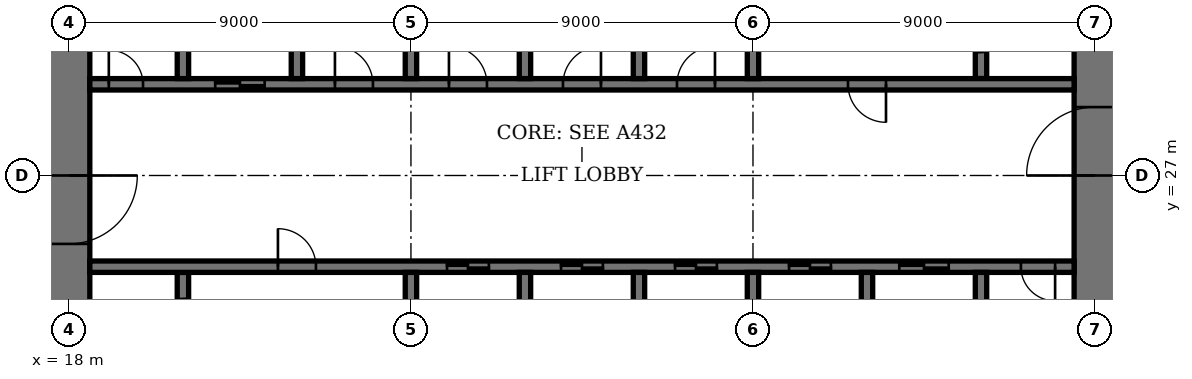
"""IFC4 building model, lengths in metres.
Left out: names, types, materials, properties, quantities, classifications, styles, units other than length and angle.
Written with IfcOpenShell. Run it as: python <this file> out.ifc"""

import sys

from ifc_helpers import new_model, si_unit, direction, frame, frame_2d, origin, place, context, subcontext, project, spatial, rectangle, extrude, element, fill, save


model = new_model("IFC4")
c1 = context("Model", 3, precision=1e-05, world=origin(), true_north=direction((0.0, 1.0)))
c2 = subcontext(c1, "Body", "Model", "MODEL_VIEW")
j1 = project(units=[si_unit("LENGTHUNIT", "METRE"), si_unit("PLANEANGLEUNIT", "RADIAN")], contexts=[c1])
p1 = place(None, origin())
s1 = spatial("IfcSite", under=j1, at=p1, CompositionType="ELEMENT")
p2 = place(p1, origin())
s2 = spatial("IfcBuilding", under=s1, at=p2, CompositionType="ELEMENT")
p3 = place(p2, frame((0.0, 0.0, 287.4)))
s3 = spatial("IfcBuildingStorey", under=s2, at=p3, CompositionType="ELEMENT", Elevation=287.4)
p4 = place(p3, frame((18.0, 35.45, 0.0), z_axis=(0.0, 0.0, 1.0), x_axis=(0.0, -1.0, 0.0)))
e1 = element("IfcWall", 1, at=p4, inside=s3, PredefinedType="SHEAR", context=c2, shape_type="SweptSolid", body=[
    extrude(rectangle(XDim=16.9, YDim=1.1, at=frame_2d((8.45, 0.0))), origin(), (0.0, 0.0, 1.0), 4.0),
])
p5 = place(p4, frame((8.45, 0.0, 0.0)))
e2 = element("IfcOpeningElement", 2, at=p5, cuts=e1, PredefinedType="OPENING", context=c2, shape_type="SweptSolid", body=[
    extrude(rectangle(XDim=1.8, YDim=2.4, at=frame_2d((0.9, 1.2))), frame((0.0, 0.56, 0.0), z_axis=(0.0, -1.0, 0.0), x_axis=(1.0, 0.0, 0.0)), (0.0, 0.0, 1.0), 1.12),
])
p6 = place(p3, frame((45.0, 18.55, 0.0), z_axis=(0.0, 0.0, 1.0), x_axis=(0.0, 1.0, 0.0)))
e3 = element("IfcWall", 3, at=p6, inside=s3, PredefinedType="SHEAR", context=c2, shape_type="SweptSolid", body=[
    extrude(rectangle(XDim=16.9, YDim=1.1, at=frame_2d((8.45, 0.0))), origin(), (0.0, 0.0, 1.0), 4.0),
])
p7 = place(p6, frame((8.45, 0.0, 0.0)))
e4 = element("IfcOpeningElement", 4, at=p7, cuts=e3, PredefinedType="OPENING", context=c2, shape_type="SweptSolid", body=[
    extrude(rectangle(XDim=1.8, YDim=2.4, at=frame_2d((0.9, 1.2))), frame((0.0, 0.56, 0.0), z_axis=(0.0, -1.0, 0.0), x_axis=(1.0, 0.0, 0.0)), (0.0, 0.0, 1.0), 1.12),
])
p8 = place(p3, frame((21.0, 21.95, 0.0), z_axis=(0.0, 0.0, 1.0), x_axis=(0.0, 1.0, 0.0)))
e5 = element("IfcWall", 5, at=p8, inside=s3, PredefinedType="SHEAR", context=c2, shape_type="SweptSolid", body=[
    extrude(rectangle(XDim=2.5, YDim=0.3, at=frame_2d((1.25, 0.0))), origin(), (0.0, 0.0, 1.0), 4.0),
])
p9 = place(p8, frame((0.7, 0.0, 0.0)))
e6 = element("IfcOpeningElement", 6, at=p9, cuts=e5, PredefinedType="OPENING", context=c2, shape_type="SweptSolid", body=[
    extrude(rectangle(XDim=1.1, YDim=2.4, at=frame_2d((0.55, 1.2))), frame((0.0, 0.16, 0.0), z_axis=(0.0, -1.0, 0.0), x_axis=(1.0, 0.0, 0.0)), (0.0, 0.0, 1.0), 0.32),
])
p10 = place(p3, frame((42.0, 29.55, 0.0), z_axis=(0.0, 0.0, 1.0), x_axis=(0.0, 1.0, 0.0)))
e7 = element("IfcWall", 7, at=p10, inside=s3, PredefinedType="SHEAR", context=c2, shape_type="SweptSolid", body=[
    extrude(rectangle(XDim=2.5, YDim=0.3, at=frame_2d((1.25, 0.0))), origin(), (0.0, 0.0, 1.0), 4.0),
])
p11 = place(p10, frame((0.7, 0.0, 0.0)))
e8 = element("IfcOpeningElement", 8, at=p11, cuts=e7, PredefinedType="OPENING", context=c2, shape_type="SweptSolid", body=[
    extrude(rectangle(XDim=1.1, YDim=2.4, at=frame_2d((0.55, 1.2))), frame((0.0, 0.16, 0.0), z_axis=(0.0, -1.0, 0.0), x_axis=(1.0, 0.0, 0.0)), (0.0, 0.0, 1.0), 0.32),
])
p12 = place(p3, frame((18.55, 24.6, 0.0), z_axis=(0.0, 0.0, 1.0), x_axis=(1.0, 0.0, 0.0)))
e9 = element("IfcWall", 9, at=p12, inside=s3, PredefinedType="SHEAR", context=c2, shape_type="SweptSolid", body=[
    extrude(rectangle(XDim=25.9, YDim=0.3, at=frame_2d((12.95, 0.0))), origin(), (0.0, 0.0, 1.0), 4.0),
])
p13 = place(p12, frame((4.95, 0.0, 0.0)))
e10 = element("IfcOpeningElement", 10, at=p13, cuts=e9, PredefinedType="OPENING", context=c2, shape_type="SweptSolid", body=[
    extrude(rectangle(XDim=1.0, YDim=2.4, at=frame_2d((0.5, 1.2))), frame((0.0, 0.16, 0.0), z_axis=(0.0, -1.0, 0.0), x_axis=(1.0, 0.0, 0.0)), (0.0, 0.0, 1.0), 0.32),
])
p14 = place(p12, frame((24.5, 0.0, 0.0)))
e11 = element("IfcOpeningElement", 11, at=p14, cuts=e9, PredefinedType="OPENING", context=c2, shape_type="SweptSolid", body=[
    extrude(rectangle(XDim=0.9, YDim=2.1, at=frame_2d((0.45, 1.05))), frame((0.0, 0.16, 0.0), z_axis=(0.0, -1.0, 0.0), x_axis=(1.0, 0.0, 0.0)), (0.0, 0.0, 1.0), 0.32),
])
p15 = place(p12, frame((9.4, 0.0, 0.0)))
e12 = element("IfcOpeningElement", 12, at=p15, cuts=e9, PredefinedType="OPENING", context=c2, shape_type="SweptSolid", body=[
    extrude(rectangle(XDim=1.1, YDim=2.4, at=frame_2d((0.55, 1.2))), frame((0.0, 0.16, 0.0), z_axis=(0.0, -1.0, 0.0), x_axis=(1.0, 0.0, 0.0)), (0.0, 0.0, 1.0), 0.32),
])
p16 = place(p12, frame((12.4, 0.0, 0.0)))
e13 = element("IfcOpeningElement", 13, at=p16, cuts=e9, PredefinedType="OPENING", context=c2, shape_type="SweptSolid", body=[
    extrude(rectangle(XDim=1.1, YDim=2.4, at=frame_2d((0.55, 1.2))), frame((0.0, 0.16, 0.0), z_axis=(0.0, -1.0, 0.0), x_axis=(1.0, 0.0, 0.0)), (0.0, 0.0, 1.0), 0.32),
])
p17 = place(p12, frame((15.4, 0.0, 0.0)))
e14 = element("IfcOpeningElement", 14, at=p17, cuts=e9, PredefinedType="OPENING", context=c2, shape_type="SweptSolid", body=[
    extrude(rectangle(XDim=1.1, YDim=2.4, at=frame_2d((0.55, 1.2))), frame((0.0, 0.16, 0.0), z_axis=(0.0, -1.0, 0.0), x_axis=(1.0, 0.0, 0.0)), (0.0, 0.0, 1.0), 0.32),
])
p18 = place(p12, frame((18.4, 0.0, 0.0)))
e15 = element("IfcOpeningElement", 15, at=p18, cuts=e9, PredefinedType="OPENING", context=c2, shape_type="SweptSolid", body=[
    extrude(rectangle(XDim=1.1, YDim=2.4, at=frame_2d((0.55, 1.2))), frame((0.0, 0.16, 0.0), z_axis=(0.0, -1.0, 0.0), x_axis=(1.0, 0.0, 0.0)), (0.0, 0.0, 1.0), 0.32),
])
p19 = place(p12, frame((21.3, 0.0, 0.0)))
e16 = element("IfcOpeningElement", 16, at=p19, cuts=e9, PredefinedType="OPENING", context=c2, shape_type="SweptSolid", body=[
    extrude(rectangle(XDim=1.3, YDim=2.4, at=frame_2d((0.65, 1.2))), frame((0.0, 0.16, 0.0), z_axis=(0.0, -1.0, 0.0), x_axis=(1.0, 0.0, 0.0)), (0.0, 0.0, 1.0), 0.32),
])
p20 = place(p3, frame((18.55, 29.4, 0.0), z_axis=(0.0, 0.0, 1.0), x_axis=(1.0, 0.0, 0.0)))
e17 = element("IfcWall", 17, at=p20, inside=s3, PredefinedType="SHEAR", context=c2, shape_type="SweptSolid", body=[
    extrude(rectangle(XDim=25.9, YDim=0.3, at=frame_2d((12.95, 0.0))), origin(), (0.0, 0.0, 1.0), 4.0),
])
p21 = place(p20, frame((19.95, 0.0, 0.0)))
e18 = element("IfcOpeningElement", 18, at=p21, cuts=e17, PredefinedType="OPENING", context=c2, shape_type="SweptSolid", body=[
    extrude(rectangle(XDim=1.0, YDim=2.4, at=frame_2d((0.5, 1.2))), frame((0.0, 0.16, 0.0), z_axis=(0.0, -1.0, 0.0), x_axis=(1.0, 0.0, 0.0)), (0.0, 0.0, 1.0), 0.32),
])
p22 = place(p20, frame((0.5, 0.0, 0.0)))
e19 = element("IfcOpeningElement", 19, at=p22, cuts=e17, PredefinedType="OPENING", context=c2, shape_type="SweptSolid", body=[
    extrude(rectangle(XDim=0.9, YDim=2.1, at=frame_2d((0.45, 1.05))), frame((0.0, 0.16, 0.0), z_axis=(0.0, -1.0, 0.0), x_axis=(1.0, 0.0, 0.0)), (0.0, 0.0, 1.0), 0.32),
])
p23 = place(p20, frame((15.45, 0.0, 0.0)))
e20 = element("IfcOpeningElement", 20, at=p23, cuts=e17, PredefinedType="OPENING", context=c2, shape_type="SweptSolid", body=[
    extrude(rectangle(XDim=1.0, YDim=2.4, at=frame_2d((0.5, 1.2))), frame((0.0, 0.16, 0.0), z_axis=(0.0, -1.0, 0.0), x_axis=(1.0, 0.0, 0.0)), (0.0, 0.0, 1.0), 0.32),
])
p24 = place(p20, frame((12.45, 0.0, 0.0)))
e21 = element("IfcOpeningElement", 21, at=p24, cuts=e17, PredefinedType="OPENING", context=c2, shape_type="SweptSolid", body=[
    extrude(rectangle(XDim=1.0, YDim=2.4, at=frame_2d((0.5, 1.2))), frame((0.0, 0.16, 0.0), z_axis=(0.0, -1.0, 0.0), x_axis=(1.0, 0.0, 0.0)), (0.0, 0.0, 1.0), 0.32),
])
p25 = place(p20, frame((9.45, 0.0, 0.0)))
e22 = element("IfcOpeningElement", 22, at=p25, cuts=e17, PredefinedType="OPENING", context=c2, shape_type="SweptSolid", body=[
    extrude(rectangle(XDim=1.0, YDim=2.4, at=frame_2d((0.5, 1.2))), frame((0.0, 0.16, 0.0), z_axis=(0.0, -1.0, 0.0), x_axis=(1.0, 0.0, 0.0)), (0.0, 0.0, 1.0), 0.32),
])
p26 = place(p20, frame((6.45, 0.0, 0.0)))
e23 = element("IfcOpeningElement", 23, at=p26, cuts=e17, PredefinedType="OPENING", context=c2, shape_type="SweptSolid", body=[
    extrude(rectangle(XDim=1.0, YDim=2.4, at=frame_2d((0.5, 1.2))), frame((0.0, 0.16, 0.0), z_axis=(0.0, -1.0, 0.0), x_axis=(1.0, 0.0, 0.0)), (0.0, 0.0, 1.0), 0.32),
])
p27 = place(p20, frame((3.3, 0.0, 0.0)))
e24 = element("IfcOpeningElement", 24, at=p27, cuts=e17, PredefinedType="OPENING", context=c2, shape_type="SweptSolid", body=[
    extrude(rectangle(XDim=1.3, YDim=2.4, at=frame_2d((0.65, 1.2))), frame((0.0, 0.16, 0.0), z_axis=(0.0, -1.0, 0.0), x_axis=(1.0, 0.0, 0.0)), (0.0, 0.0, 1.0), 0.32),
])
for number, where, z_axis, x_axis in (
    (25, (30.0, 21.75, 0.0), (0.0, 0.0, 1.0), (0.0, 1.0, 0.0)),
    (26, (33.0, 29.55, 0.0), (0.0, 0.0, 1.0), (0.0, 1.0, 0.0)),
    (27, (33.0, 21.75, 0.0), (0.0, 0.0, 1.0), (0.0, 1.0, 0.0)),
    (28, (30.0, 29.55, 0.0), (0.0, 0.0, 1.0), (0.0, 1.0, 0.0)),
    (29, (36.0, 21.75, 0.0), (0.0, 0.0, 1.0), (0.0, 1.0, 0.0)),
    (30, (27.0, 29.55, 0.0), (0.0, 0.0, 1.0), (0.0, 1.0, 0.0)),
):
    element("IfcWall", number, at=place(p3, frame(where, z_axis=z_axis, x_axis=x_axis)), inside=s3, PredefinedType="SHEAR", context=c2, shape_type="SweptSolid", body=[
        extrude(rectangle(XDim=2.7, YDim=0.3, at=frame_2d((1.35, 0.0))), origin(), (0.0, 0.0, 1.0), 4.0),
    ])
for number, where, z_axis, x_axis in (
    (31, (39.0, 18.55, 0.0), (0.0, 0.0, 1.0), (0.0, 1.0, 0.0)),
    (32, (24.0, 29.55, 0.0), (0.0, 0.0, 1.0), (0.0, 1.0, 0.0)),
):
    element("IfcWall", number, at=place(p3, frame(where, z_axis=z_axis, x_axis=x_axis)), inside=s3, PredefinedType="SHEAR", context=c2, shape_type="SweptSolid", body=[
        extrude(rectangle(XDim=5.9, YDim=0.3, at=frame_2d((2.95, 0.0))), origin(), (0.0, 0.0, 1.0), 4.0),
    ])
for number, where, z_axis, x_axis in (
    (33, (42.0, 21.75, 0.0), (0.0, 0.0, 1.0), (0.0, 1.0, 0.0)),
    (34, (21.0, 29.55, 0.0), (0.0, 0.0, 1.0), (0.0, 1.0, 0.0)),
):
    element("IfcWall", number, at=place(p3, frame(where, z_axis=z_axis, x_axis=x_axis)), inside=s3, PredefinedType="SHEAR", context=c2, shape_type="SweptSolid", body=[
        extrude(rectangle(XDim=2.7, YDim=0.3, at=frame_2d((1.35, 0.0))), origin(), (0.0, 0.0, 1.0), 4.0),
    ])
for number, where, z_axis, x_axis in (
    (35, (27.0, 21.6, 0.0), (0.0, 0.0, 1.0), (0.0, 1.0, 0.0)),
    (36, (36.0, 29.55, 0.0), (0.0, 0.0, 1.0), (0.0, 1.0, 0.0)),
):
    element("IfcWall", number, at=place(p3, frame(where, z_axis=z_axis, x_axis=x_axis)), inside=s3, PredefinedType="SHEAR", context=c2, shape_type="SweptSolid", body=[
        extrude(rectangle(XDim=2.85, YDim=0.3, at=frame_2d((1.425, 0.0))), origin(), (0.0, 0.0, 1.0), 4.0),
    ])
p28 = place(p5, origin())
e37 = element("IfcDoor", 37, at=p28, inside=s3, OperationType="DOUBLE_DOOR_DOUBLE_SWING", PredefinedType="DOOR", context=c2, shape_type="SweptSolid", body=[
    extrude(rectangle(XDim=1.8, YDim=2.4, at=frame_2d((0.9, 1.2))), frame((0.0, 0.03, 0.0), z_axis=(0.0, -1.0, 0.0), x_axis=(1.0, 0.0, 0.0)), (0.0, 0.0, 1.0), 0.06),
    extrude(rectangle(XDim=0.04, YDim=2.4, at=frame_2d((0.02, 1.2))), frame((0.0, 0.55, 0.0), z_axis=(0.0, -1.0, 0.0), x_axis=(1.0, 0.0, 0.0)), (0.0, 0.0, 1.0), 1.1),
    extrude(rectangle(XDim=0.04, YDim=2.4, at=frame_2d((1.78, 1.2))), frame((0.0, 0.55, 0.0), z_axis=(0.0, -1.0, 0.0), x_axis=(1.0, 0.0, 0.0)), (0.0, 0.0, 1.0), 1.1),
    extrude(rectangle(XDim=1.8, YDim=0.04, at=frame_2d((0.9, 2.38))), frame((0.0, 0.55, 0.0), z_axis=(0.0, -1.0, 0.0), x_axis=(1.0, 0.0, 0.0)), (0.0, 0.0, 1.0), 1.1),
])
fill(e2, e37)
p29 = place(p7, origin())
e38 = element("IfcDoor", 38, at=p29, inside=s3, OperationType="DOUBLE_DOOR_DOUBLE_SWING", PredefinedType="DOOR", context=c2, shape_type="SweptSolid", body=[
    extrude(rectangle(XDim=1.8, YDim=2.4, at=frame_2d((0.9, 1.2))), frame((0.0, 0.03, 0.0), z_axis=(0.0, -1.0, 0.0), x_axis=(1.0, 0.0, 0.0)), (0.0, 0.0, 1.0), 0.06),
    extrude(rectangle(XDim=0.04, YDim=2.4, at=frame_2d((0.02, 1.2))), frame((0.0, 0.55, 0.0), z_axis=(0.0, -1.0, 0.0), x_axis=(1.0, 0.0, 0.0)), (0.0, 0.0, 1.0), 1.1),
    extrude(rectangle(XDim=0.04, YDim=2.4, at=frame_2d((1.78, 1.2))), frame((0.0, 0.55, 0.0), z_axis=(0.0, -1.0, 0.0), x_axis=(1.0, 0.0, 0.0)), (0.0, 0.0, 1.0), 1.1),
    extrude(rectangle(XDim=1.8, YDim=0.04, at=frame_2d((0.9, 2.38))), frame((0.0, 0.55, 0.0), z_axis=(0.0, -1.0, 0.0), x_axis=(1.0, 0.0, 0.0)), (0.0, 0.0, 1.0), 1.1),
])
fill(e4, e38)
p30 = place(p13, origin())
e39 = element("IfcDoor", 39, at=p30, inside=s3, OperationType="SINGLE_SWING_RIGHT", PredefinedType="DOOR", context=c2, shape_type="SweptSolid", body=[
    extrude(rectangle(XDim=1.0, YDim=2.4, at=frame_2d((0.5, 1.2))), frame((0.0, 0.03, 0.0), z_axis=(0.0, -1.0, 0.0), x_axis=(1.0, 0.0, 0.0)), (0.0, 0.0, 1.0), 0.06),
])
fill(e10, e39)
p31 = place(p21, origin())
e40 = element("IfcDoor", 40, at=p31, inside=s3, OperationType="SINGLE_SWING_RIGHT", PredefinedType="DOOR", context=c2, shape_type="SweptSolid", body=[
    extrude(rectangle(XDim=1.0, YDim=2.4, at=frame_2d((0.5, 1.2))), frame((0.0, 0.03, 0.0), z_axis=(0.0, -1.0, 0.0), x_axis=(1.0, 0.0, 0.0)), (0.0, 0.0, 1.0), 0.06),
])
fill(e18, e40)
p32 = place(p14, origin())
e41 = element("IfcDoor", 41, at=p32, inside=s3, OperationType="SINGLE_SWING_RIGHT", PredefinedType="DOOR", context=c2, shape_type="SweptSolid", body=[
    extrude(rectangle(XDim=0.9, YDim=2.1, at=frame_2d((0.45, 1.05))), frame((0.0, 0.03, 0.0), z_axis=(0.0, -1.0, 0.0), x_axis=(1.0, 0.0, 0.0)), (0.0, 0.0, 1.0), 0.06),
])
fill(e11, e41)
p33 = place(p22, origin())
e42 = element("IfcDoor", 42, at=p33, inside=s3, OperationType="SINGLE_SWING_RIGHT", PredefinedType="DOOR", context=c2, shape_type="SweptSolid", body=[
    extrude(rectangle(XDim=0.9, YDim=2.1, at=frame_2d((0.45, 1.05))), frame((0.0, 0.03, 0.0), z_axis=(0.0, -1.0, 0.0), x_axis=(1.0, 0.0, 0.0)), (0.0, 0.0, 1.0), 0.06),
])
fill(e19, e42)
p34 = place(p15, origin())
e43 = element("IfcDoor", 43, at=p34, inside=s3, OperationType="DOUBLE_DOOR_SLIDING", PredefinedType="DOOR", context=c2, shape_type="SweptSolid", body=[
    extrude(rectangle(XDim=1.1, YDim=2.4, at=frame_2d((0.55, 1.2))), frame((0.0, 0.02, 0.0), z_axis=(0.0, -1.0, 0.0), x_axis=(1.0, 0.0, 0.0)), (0.0, 0.0, 1.0), 0.04),
])
fill(e12, e43)
p35 = place(p16, origin())
e44 = element("IfcDoor", 44, at=p35, inside=s3, OperationType="DOUBLE_DOOR_SLIDING", PredefinedType="DOOR", context=c2, shape_type="SweptSolid", body=[
    extrude(rectangle(XDim=1.1, YDim=2.4, at=frame_2d((0.55, 1.2))), frame((0.0, 0.02, 0.0), z_axis=(0.0, -1.0, 0.0), x_axis=(1.0, 0.0, 0.0)), (0.0, 0.0, 1.0), 0.04),
])
fill(e13, e44)
p36 = place(p17, origin())
e45 = element("IfcDoor", 45, at=p36, inside=s3, OperationType="DOUBLE_DOOR_SLIDING", PredefinedType="DOOR", context=c2, shape_type="SweptSolid", body=[
    extrude(rectangle(XDim=1.1, YDim=2.4, at=frame_2d((0.55, 1.2))), frame((0.0, 0.02, 0.0), z_axis=(0.0, -1.0, 0.0), x_axis=(1.0, 0.0, 0.0)), (0.0, 0.0, 1.0), 0.04),
])
fill(e14, e45)
p37 = place(p18, origin())
e46 = element("IfcDoor", 46, at=p37, inside=s3, OperationType="DOUBLE_DOOR_SLIDING", PredefinedType="DOOR", context=c2, shape_type="SweptSolid", body=[
    extrude(rectangle(XDim=1.1, YDim=2.4, at=frame_2d((0.55, 1.2))), frame((0.0, 0.02, 0.0), z_axis=(0.0, -1.0, 0.0), x_axis=(1.0, 0.0, 0.0)), (0.0, 0.0, 1.0), 0.04),
])
fill(e15, e46)
p38 = place(p23, origin())
e47 = element("IfcDoor", 47, at=p38, inside=s3, OperationType="SINGLE_SWING_LEFT", PredefinedType="DOOR", context=c2, shape_type="SweptSolid", body=[
    extrude(rectangle(XDim=1.0, YDim=2.4, at=frame_2d((0.5, 1.2))), frame((0.0, 0.03, 0.0), z_axis=(0.0, -1.0, 0.0), x_axis=(1.0, 0.0, 0.0)), (0.0, 0.0, 1.0), 0.06),
])
fill(e20, e47)
p39 = place(p24, origin())
e48 = element("IfcDoor", 48, at=p39, inside=s3, OperationType="SINGLE_SWING_LEFT", PredefinedType="DOOR", context=c2, shape_type="SweptSolid", body=[
    extrude(rectangle(XDim=1.0, YDim=2.4, at=frame_2d((0.5, 1.2))), frame((0.0, 0.03, 0.0), z_axis=(0.0, -1.0, 0.0), x_axis=(1.0, 0.0, 0.0)), (0.0, 0.0, 1.0), 0.06),
])
fill(e21, e48)
p40 = place(p25, origin())
e49 = element("IfcDoor", 49, at=p40, inside=s3, OperationType="SINGLE_SWING_RIGHT", PredefinedType="DOOR", context=c2, shape_type="SweptSolid", body=[
    extrude(rectangle(XDim=1.0, YDim=2.4, at=frame_2d((0.5, 1.2))), frame((0.0, 0.03, 0.0), z_axis=(0.0, -1.0, 0.0), x_axis=(1.0, 0.0, 0.0)), (0.0, 0.0, 1.0), 0.06),
])
fill(e22, e49)
p41 = place(p26, origin())
e50 = element("IfcDoor", 50, at=p41, inside=s3, OperationType="SINGLE_SWING_RIGHT", PredefinedType="DOOR", context=c2, shape_type="SweptSolid", body=[
    extrude(rectangle(XDim=1.0, YDim=2.4, at=frame_2d((0.5, 1.2))), frame((0.0, 0.03, 0.0), z_axis=(0.0, -1.0, 0.0), x_axis=(1.0, 0.0, 0.0)), (0.0, 0.0, 1.0), 0.06),
])
fill(e23, e50)
p42 = place(p19, origin())
e51 = element("IfcDoor", 51, at=p42, inside=s3, OperationType="DOUBLE_DOOR_SLIDING", PredefinedType="DOOR", context=c2, shape_type="SweptSolid", body=[
    extrude(rectangle(XDim=1.3, YDim=2.4, at=frame_2d((0.65, 1.2))), frame((0.0, 0.02, 0.0), z_axis=(0.0, -1.0, 0.0), x_axis=(1.0, 0.0, 0.0)), (0.0, 0.0, 1.0), 0.04),
])
fill(e16, e51)
p43 = place(p27, origin())
e52 = element("IfcDoor", 52, at=p43, inside=s3, OperationType="DOUBLE_DOOR_SLIDING", PredefinedType="DOOR", context=c2, shape_type="SweptSolid", body=[
    extrude(rectangle(XDim=1.3, YDim=2.4, at=frame_2d((0.65, 1.2))), frame((0.0, 0.02, 0.0), z_axis=(0.0, -1.0, 0.0), x_axis=(1.0, 0.0, 0.0)), (0.0, 0.0, 1.0), 0.04),
])
fill(e24, e52)
save(model, sys.argv[1])
